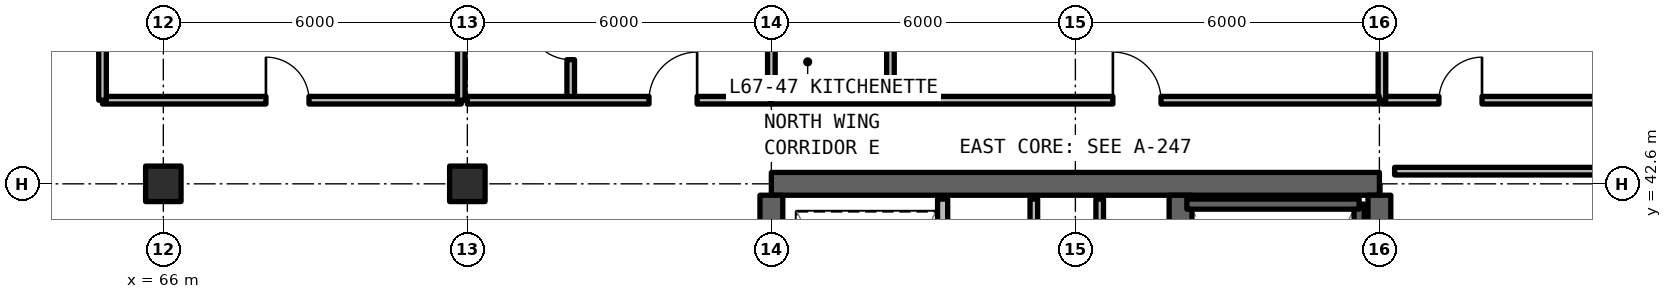
"""IFC4 building model, lengths in metres.
Left out: names, types, materials, properties, quantities, classifications, styles, units other than length and angle.
Written with IfcOpenShell. Run it as: python <this file> out.ifc"""

import sys

from ifc_helpers import new_model, si_unit, direction, frame, frame_2d, origin, origin_2d, place, context, subcontext, project, spatial, rectangle, extrude, element, fill, save


model = new_model("IFC4")
c1 = context("Model", 3, precision=1e-05, world=origin(), true_north=direction((0.0, 1.0)))
c2 = subcontext(c1, "Body", "Model", "MODEL_VIEW")
j1 = project(units=[si_unit("LENGTHUNIT", "METRE"), si_unit("PLANEANGLEUNIT", "RADIAN")], contexts=[c1])
p1 = place(None, origin())
s1 = spatial("IfcSite", under=j1, at=p1, CompositionType="ELEMENT")
p2 = place(p1, origin())
s2 = spatial("IfcBuilding", under=s1, at=p2, CompositionType="ELEMENT")
p3 = place(p2, frame((0.0, 0.0, 239.25)))
s3 = spatial("IfcBuildingStorey", under=s2, at=p3, CompositionType="ELEMENT", Elevation=239.25)
p4 = place(p3, frame((90.0, 42.6, 0.0), z_axis=(0.0, 0.0, 1.0), x_axis=(-1.0, 0.0, 0.0)))
e1 = element("IfcWall", 1, at=p4, inside=s3, PredefinedType="SHEAR", context=c2, shape_type="SweptSolid", body=[
    extrude(rectangle(XDim=12.0, YDim=0.45, at=frame_2d((6.0, 0.0))), origin(), (0.0, 0.0, 1.0), 3.3),
])
p5 = place(p3, frame((90.0, 24.825, 0.0), z_axis=(0.0, 0.0, 1.0), x_axis=(0.0, 1.0, 0.0)))
e2 = element("IfcWall", 2, at=p5, inside=s3, PredefinedType="SHEAR", context=c2, shape_type="SweptSolid", body=[
    extrude(rectangle(XDim=17.55, YDim=0.45, at=frame_2d((8.775, 0.0))), origin(), (0.0, 0.0, 1.0), 3.3),
])
p6 = place(p3, frame((78.0, 36.8, 0.0), z_axis=(0.0, 0.0, 1.0), x_axis=(0.0, 1.0, 0.0)))
e3 = element("IfcWall", 3, at=p6, inside=s3, PredefinedType="SHEAR", context=c2, shape_type="SweptSolid", body=[
    extrude(rectangle(XDim=5.575, YDim=0.45, at=frame_2d((2.788, 0.0))), origin(), (0.0, 0.0, 1.0), 3.3),
])
p7 = place(p3, frame((86.075, 24.825, 0.0), z_axis=(0.0, 0.0, 1.0), x_axis=(0.0, 1.0, 0.0)))
e4 = element("IfcWall", 4, at=p7, inside=s3, PredefinedType="SHEAR", context=c2, shape_type="SweptSolid", body=[
    extrude(rectangle(XDim=17.55, YDim=0.45, at=frame_2d((8.775, 0.0))), origin(), (0.0, 0.0, 1.0), 3.3),
])
p8 = place(p7, frame((0.425, 0.0, 0.0)))
e5 = element("IfcOpeningElement", 5, at=p8, cuts=e4, PredefinedType="OPENING", context=c2, shape_type="SweptSolid", body=[
    extrude(rectangle(XDim=1.15, YDim=2.15, at=frame_2d((0.575, 1.075))), frame((0.0, 0.235, 0.0), z_axis=(0.0, -1.0, 0.0), x_axis=(1.0, 0.0, 0.0)), (0.0, 0.0, 1.0), 0.47),
])
p9 = place(p7, frame((9.625, 0.0, 0.0)))
e6 = element("IfcOpeningElement", 6, at=p9, cuts=e4, PredefinedType="OPENING", context=c2, shape_type="SweptSolid", body=[
    extrude(rectangle(XDim=1.15, YDim=2.15, at=frame_2d((0.575, 1.075))), frame((0.0, 0.235, 0.0), z_axis=(0.0, -1.0, 0.0), x_axis=(1.0, 0.0, 0.0)), (0.0, 0.0, 1.0), 0.47),
])
for number, where, z_axis, x_axis in (
    (7, (66.0, 42.6, 0.0), (0.0, 0.0, 1.0), (1.0, 0.0, 0.0)),
    (8, (72.0, 42.6, 0.0), (0.0, 0.0, 1.0), (1.0, 0.0, 0.0)),
):
    element("IfcColumn", number, at=place(p3, frame(where, z_axis=z_axis, x_axis=x_axis)), inside=s3, PredefinedType="COLUMN", context=c2, shape_type="SweptSolid", body=[
        extrude(rectangle(XDim=0.7, YDim=0.7, at=origin_2d()), origin(), (0.0, 0.0, 1.0), 3.3),
    ])
p10 = place(p3, frame((84.48, 36.88, 0.0), z_axis=(0.0, 0.0, 1.0), x_axis=(0.0, 1.0, 0.0)))
e9 = element("IfcWall", 9, at=p10, inside=s3, PredefinedType="SOLIDWALL", context=c2, shape_type="SweptSolid", body=[
    extrude(rectangle(XDim=5.42, YDim=0.15, at=frame_2d((2.71, 0.0))), origin(), (0.0, 0.0, 1.0), 2.35),
])
p11 = place(p3, frame((83.18, 36.88, 0.0), z_axis=(0.0, 0.0, 1.0), x_axis=(0.0, 1.0, 0.0)))
e10 = element("IfcWall", 10, at=p11, inside=s3, PredefinedType="SOLIDWALL", context=c2, shape_type="SweptSolid", body=[
    extrude(rectangle(XDim=5.42, YDim=0.15, at=frame_2d((2.71, 0.0))), origin(), (0.0, 0.0, 1.0), 2.35),
])
p12 = place(p11, frame((2.1, 0.0, 0.0)))
e11 = element("IfcOpeningElement", 11, at=p12, cuts=e10, PredefinedType="OPENING", context=c2, shape_type="SweptSolid", body=[
    extrude(rectangle(XDim=0.95, YDim=2.15, at=frame_2d((0.475, 1.075))), frame((0.0, 0.085, 0.0), z_axis=(0.0, -1.0, 0.0), x_axis=(1.0, 0.0, 0.0)), (0.0, 0.0, 1.0), 0.17),
])
p13 = place(p3, frame((81.38, 36.88, 0.0), z_axis=(0.0, 0.0, 1.0), x_axis=(0.0, 1.0, 0.0)))
e12 = element("IfcWall", 12, at=p13, inside=s3, PredefinedType="SOLIDWALL", context=c2, shape_type="SweptSolid", body=[
    extrude(rectangle(XDim=5.42, YDim=0.2, at=frame_2d((2.71, 0.0))), origin(), (0.0, 0.0, 1.0), 2.35),
])
p14 = place(p13, frame((0.8, 0.0, 0.0)))
e13 = element("IfcOpeningElement", 13, at=p14, cuts=e12, PredefinedType="OPENING", context=c2, shape_type="SweptSolid", body=[
    extrude(rectangle(XDim=1.1, YDim=2.2, at=frame_2d((0.55, 1.1))), frame((0.0, 0.11, 0.0), z_axis=(0.0, -1.0, 0.0), x_axis=(1.0, 0.0, 0.0)), (0.0, 0.0, 1.0), 0.22),
])
p15 = place(p13, frame((3.3, 0.0, 0.0)))
e14 = element("IfcOpeningElement", 14, at=p15, cuts=e12, PredefinedType="OPENING", context=c2, shape_type="SweptSolid", body=[
    extrude(rectangle(XDim=1.1, YDim=2.2, at=frame_2d((0.55, 1.1))), frame((0.0, 0.11, 0.0), z_axis=(0.0, -1.0, 0.0), x_axis=(1.0, 0.0, 0.0)), (0.0, 0.0, 1.0), 0.22),
])
p16 = place(p3, frame((64.8, 44.25, 0.0), z_axis=(0.0, 0.0, 1.0), x_axis=(1.0, 0.0, 0.0)))
e15 = element("IfcWall", 15, at=p16, inside=s3, PredefinedType="SOLIDWALL", context=c2, shape_type="SweptSolid", body=[
    extrude(rectangle(XDim=7.08, YDim=0.15, at=frame_2d((3.54, 0.0))), origin(), (0.0, 0.0, 1.0), 2.35),
])
p17 = place(p16, frame((3.225, 0.0, 0.0)))
e16 = element("IfcOpeningElement", 16, at=p17, cuts=e15, PredefinedType="OPENING", context=c2, shape_type="SweptSolid", body=[
    extrude(rectangle(XDim=0.85, YDim=2.1, at=frame_2d((0.425, 1.05))), frame((0.0, 0.085, 0.0), z_axis=(0.0, -1.0, 0.0), x_axis=(1.0, 0.0, 0.0)), (0.0, 0.0, 1.0), 0.17),
])
p18 = place(p3, frame((64.8, 44.25, 0.0), z_axis=(0.0, 0.0, 1.0), x_axis=(0.0, 1.0, 0.0)))
e17 = element("IfcWall", 17, at=p18, inside=s3, PredefinedType="SOLIDWALL", context=c2, shape_type="SweptSolid", body=[
    extrude(rectangle(XDim=3.4, YDim=0.15, at=frame_2d((1.7, 0.0))), origin(), (0.0, 0.0, 1.0), 2.35),
])
p19 = place(p3, frame((71.88, 44.25, 0.0), z_axis=(0.0, 0.0, 1.0), x_axis=(0.0, 1.0, 0.0)))
e18 = element("IfcWall", 18, at=p19, inside=s3, PredefinedType="SOLIDWALL", context=c2, shape_type="SweptSolid", body=[
    extrude(rectangle(XDim=10.61, YDim=0.15, at=frame_2d((5.305, 0.0))), origin(), (0.0, 0.0, 1.0), 2.35),
])
p20 = place(p3, frame((90.3, 42.85, 0.0), z_axis=(0.0, 0.0, 1.0), x_axis=(1.0, 0.0, 0.0)))
e19 = element("IfcWall", 19, at=p20, inside=s3, PredefinedType="SOLIDWALL", context=c2, shape_type="SweptSolid", body=[
    extrude(rectangle(XDim=8.52, YDim=0.15, at=frame_2d((4.26, 0.0))), origin(), (0.0, 0.0, 1.0), 2.35),
])
p21 = place(p3, frame((90.05, 44.25, 0.0), z_axis=(0.0, 0.0, 1.0), x_axis=(1.0, 0.0, 0.0)))
e20 = element("IfcWall", 20, at=p21, inside=s3, PredefinedType="SOLIDWALL", context=c2, shape_type="SweptSolid", body=[
    extrude(rectangle(XDim=5.37, YDim=0.15, at=frame_2d((2.685, 0.0))), origin(), (0.0, 0.0, 1.0), 2.35),
])
p22 = place(p21, frame((1.125, 0.0, 0.0)))
e21 = element("IfcOpeningElement", 21, at=p22, cuts=e20, PredefinedType="OPENING", context=c2, shape_type="SweptSolid", body=[
    extrude(rectangle(XDim=0.85, YDim=2.1, at=frame_2d((0.425, 1.05))), frame((0.0, 0.085, 0.0), z_axis=(0.0, -1.0, 0.0), x_axis=(1.0, 0.0, 0.0)), (0.0, 0.0, 1.0), 0.17),
])
for number, where, z_axis, x_axis in (
    (22, (90.05, 44.25, 0.0), (0.0, 0.0, 1.0), (0.0, 1.0, 0.0)),
    (23, (78.0, 44.25, 0.0), (0.0, 0.0, 1.0), (0.0, 1.0, 0.0)),
):
    element("IfcWall", number, at=place(p3, frame(where, z_axis=z_axis, x_axis=x_axis)), inside=s3, PredefinedType="SOLIDWALL", context=c2, shape_type="SweptSolid", body=[
        extrude(rectangle(XDim=10.61, YDim=0.15, at=frame_2d((5.305, 0.0))), origin(), (0.0, 0.0, 1.0), 2.35),
    ])
p23 = place(p3, frame((74.04, 44.25, 0.0), z_axis=(0.0, 0.0, 1.0), x_axis=(0.0, 1.0, 0.0)))
e24 = element("IfcWall", 24, at=p23, inside=s3, PredefinedType="PARTITIONING", context=c2, shape_type="SweptSolid", body=[
    extrude(rectangle(XDim=10.61, YDim=0.15, at=frame_2d((5.305, 0.0))), origin(), (0.0, 0.0, 1.0), 2.35),
])
p24 = place(p23, frame((0.8, 0.0, 0.0)))
e25 = element("IfcOpeningElement", 25, at=p24, cuts=e24, PredefinedType="OPENING", context=c2, shape_type="SweptSolid", body=[
    extrude(rectangle(XDim=0.85, YDim=2.1, at=frame_2d((0.425, 1.05))), frame((0.0, 0.085, 0.0), z_axis=(0.0, -1.0, 0.0), x_axis=(1.0, 0.0, 0.0)), (0.0, 0.0, 1.0), 0.17),
])
p25 = place(p23, frame((5.374, 0.0, 0.0)))
e26 = element("IfcOpeningElement", 26, at=p25, cuts=e24, PredefinedType="OPENING", context=c2, shape_type="SweptSolid", body=[
    extrude(rectangle(XDim=0.85, YDim=2.1, at=frame_2d((0.425, 1.05))), frame((0.0, 0.085, 0.0), z_axis=(0.0, -1.0, 0.0), x_axis=(1.0, 0.0, 0.0)), (0.0, 0.0, 1.0), 0.17),
])
p26 = place(p3, frame((72.0, 44.25, 0.0), z_axis=(0.0, 0.0, 1.0), x_axis=(1.0, 0.0, 0.0)))
e27 = element("IfcWall", 27, at=p26, inside=s3, PredefinedType="SOLIDWALL", context=c2, shape_type="SweptSolid", body=[
    extrude(rectangle(XDim=6.0, YDim=0.15, at=frame_2d((3.0, 0.0))), origin(), (0.0, 0.0, 1.0), 2.35),
])
p27 = place(p26, frame((3.585, 0.0, 0.0)))
e28 = element("IfcOpeningElement", 28, at=p27, cuts=e27, PredefinedType="OPENING", context=c2, shape_type="SweptSolid", body=[
    extrude(rectangle(XDim=0.95, YDim=2.15, at=frame_2d((0.475, 1.075))), frame((0.0, 0.085, 0.0), z_axis=(0.0, -1.0, 0.0), x_axis=(1.0, 0.0, 0.0)), (0.0, 0.0, 1.0), 0.17),
])
p28 = place(p3, frame((80.35, 44.25, 0.0), z_axis=(0.0, 0.0, 1.0), x_axis=(0.0, 1.0, 0.0)))
e29 = element("IfcWall", 29, at=p28, inside=s3, PredefinedType="PARTITIONING", context=c2, shape_type="SweptSolid", body=[
    extrude(rectangle(XDim=5.882, YDim=0.15, at=frame_2d((2.941, 0.0))), origin(), (0.0, 0.0, 1.0), 2.35),
])
p29 = place(p28, frame((1.31, 0.0, 0.0)))
e30 = element("IfcOpeningElement", 30, at=p29, cuts=e29, PredefinedType="OPENING", context=c2, shape_type="SweptSolid", body=[
    extrude(rectangle(XDim=0.85, YDim=2.1, at=frame_2d((0.425, 1.05))), frame((0.0, 0.085, 0.0), z_axis=(0.0, -1.0, 0.0), x_axis=(1.0, 0.0, 0.0)), (0.0, 0.0, 1.0), 0.17),
])
p30 = place(p28, frame((4.251, 0.0, 0.0)))
e31 = element("IfcOpeningElement", 31, at=p30, cuts=e29, PredefinedType="OPENING", context=c2, shape_type="SweptSolid", body=[
    extrude(rectangle(XDim=0.85, YDim=2.1, at=frame_2d((0.425, 1.05))), frame((0.0, 0.085, 0.0), z_axis=(0.0, -1.0, 0.0), x_axis=(1.0, 0.0, 0.0)), (0.0, 0.0, 1.0), 0.17),
])
p31 = place(p3, frame((78.0, 44.25, 0.0), z_axis=(0.0, 0.0, 1.0), x_axis=(1.0, 0.0, 0.0)))
e32 = element("IfcWall", 32, at=p31, inside=s3, PredefinedType="SOLIDWALL", context=c2, shape_type="SweptSolid", body=[
    extrude(rectangle(XDim=12.0, YDim=0.15, at=frame_2d((6.0, 0.0))), origin(), (0.0, 0.0, 1.0), 2.35),
])
p32 = place(p31, frame((6.74, 0.0, 0.0)))
e33 = element("IfcOpeningElement", 33, at=p32, cuts=e32, PredefinedType="OPENING", context=c2, shape_type="SweptSolid", body=[
    extrude(rectangle(XDim=0.95, YDim=2.15, at=frame_2d((0.475, 1.075))), frame((0.0, 0.085, 0.0), z_axis=(0.0, -1.0, 0.0), x_axis=(1.0, 0.0, 0.0)), (0.0, 0.0, 1.0), 0.17),
])
p33 = place(p3, frame((89.6, 34.2, 0.0), z_axis=(0.0, 0.0, 1.0), x_axis=(0.0, 1.0, 0.0)))
e34 = element("IfcWall", 34, at=p33, inside=s3, PredefinedType="SOLIDWALL", context=c2, shape_type="SweptSolid", body=[
    extrude(rectangle(XDim=8.0, YDim=0.2, at=frame_2d((4.0, 0.0))), origin(), (0.0, 0.0, 1.0), 3.3),
])
p34 = place(p3, frame((89.6, 42.2, 0.0), z_axis=(0.0, 0.0, 1.0), x_axis=(-1.0, 0.0, 0.0)))
e35 = element("IfcWall", 35, at=p34, inside=s3, PredefinedType="SOLIDWALL", context=c2, shape_type="SweptSolid", body=[
    extrude(rectangle(XDim=3.4, YDim=0.2, at=frame_2d((1.7, 0.0))), origin(), (0.0, 0.0, 1.0), 3.3),
])
p35 = place(p17, origin())
e36 = element("IfcDoor", 36, at=p35, inside=s3, OperationType="SINGLE_SWING_LEFT", PredefinedType="DOOR", context=c2, shape_type="SweptSolid", body=[
    extrude(rectangle(XDim=0.85, YDim=2.1, at=frame_2d((0.425, 1.05))), frame((0.0, 0.025, 0.0), z_axis=(0.0, -1.0, 0.0), x_axis=(1.0, 0.0, 0.0)), (0.0, 0.0, 1.0), 0.05),
])
fill(e16, e36)
p36 = place(p22, origin())
e37 = element("IfcDoor", 37, at=p36, inside=s3, OperationType="SINGLE_SWING_RIGHT", PredefinedType="DOOR", context=c2, shape_type="SweptSolid", body=[
    extrude(rectangle(XDim=0.85, YDim=2.1, at=frame_2d((0.425, 1.05))), frame((0.0, 0.025, 0.0), z_axis=(0.0, -1.0, 0.0), x_axis=(1.0, 0.0, 0.0)), (0.0, 0.0, 1.0), 0.05),
])
fill(e21, e37)
p37 = place(p24, origin())
e38 = element("IfcDoor", 38, at=p37, inside=s3, OperationType="SINGLE_SWING_RIGHT", PredefinedType="DOOR", context=c2, shape_type="SweptSolid", body=[
    extrude(rectangle(XDim=0.85, YDim=2.1, at=frame_2d((0.425, 1.05))), frame((0.0, 0.025, 0.0), z_axis=(0.0, -1.0, 0.0), x_axis=(1.0, 0.0, 0.0)), (0.0, 0.0, 1.0), 0.05),
])
fill(e25, e38)
p38 = place(p27, origin())
e39 = element("IfcDoor", 39, at=p38, inside=s3, OperationType="SINGLE_SWING_RIGHT", PredefinedType="DOOR", context=c2, shape_type="SweptSolid", body=[
    extrude(rectangle(XDim=0.95, YDim=2.15, at=frame_2d((0.475, 1.075))), frame((0.0, 0.025, 0.0), z_axis=(0.0, -1.0, 0.0), x_axis=(1.0, 0.0, 0.0)), (0.0, 0.0, 1.0), 0.05),
])
fill(e28, e39)
p39 = place(p32, origin())
e40 = element("IfcDoor", 40, at=p39, inside=s3, OperationType="SINGLE_SWING_LEFT", PredefinedType="DOOR", context=c2, shape_type="SweptSolid", body=[
    extrude(rectangle(XDim=0.95, YDim=2.15, at=frame_2d((0.475, 1.075))), frame((0.0, 0.025, 0.0), z_axis=(0.0, -1.0, 0.0), x_axis=(1.0, 0.0, 0.0)), (0.0, 0.0, 1.0), 0.05),
])
fill(e33, e40)
save(model, sys.argv[1])
